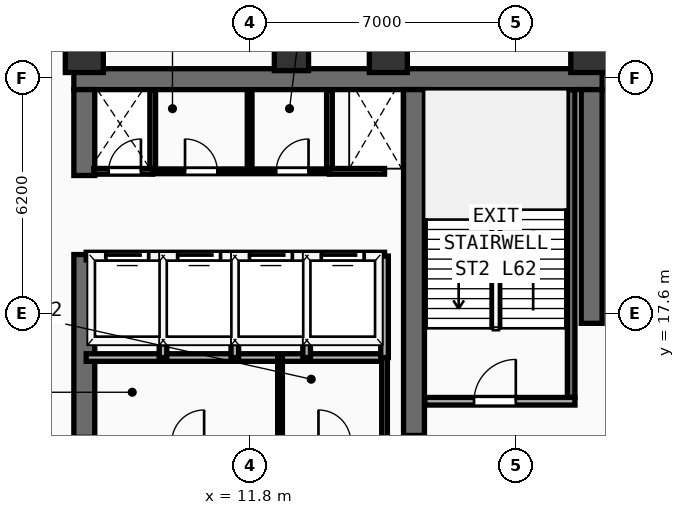
"""IFC4 building model, lengths in metres.
Left out: names, types, materials, properties, quantities, classifications, styles, units other than length and angle.
Written with IfcOpenShell. Run it as: python <this file> out.ifc"""

import sys

from ifc_helpers import new_model, si_unit, direction, frame, frame_2d, origin, origin_2d, place, context, subcontext, project, spatial, rectangle, extrude, element, fill, save


model = new_model("IFC4")
c1 = context("Model", 3, precision=1e-05, world=origin(), true_north=direction((0.0, 1.0)))
c2 = subcontext(c1, "Body", "Model", "MODEL_VIEW")
j1 = project(units=[si_unit("LENGTHUNIT", "METRE"), si_unit("PLANEANGLEUNIT", "RADIAN")], contexts=[c1])
p1 = place(None, origin())
s1 = spatial("IfcSite", under=j1, at=p1, CompositionType="ELEMENT")
p2 = place(p1, origin())
s2 = spatial("IfcBuilding", under=s1, at=p2, CompositionType="ELEMENT")
p3 = place(p2, frame((0.0, 0.0, 242.5)))
s3 = spatial("IfcBuildingStorey", under=s2, at=p3, CompositionType="ELEMENT", Elevation=242.5)
p4 = place(p3, frame((7.175, 23.775, 0.0), z_axis=(0.0, 0.0, 1.0), x_axis=(1.0, 0.0, 0.0)))
e1 = element("IfcWall", 1, at=p4, inside=s3, PredefinedType="SHEAR", context=c2, shape_type="SweptSolid", body=[
    extrude(rectangle(XDim=13.9, YDim=0.55, at=frame_2d((6.95, 0.0))), origin(), (0.0, 0.0, 1.0), 3.56),
])
p5 = place(p3, frame((7.45, 14.35, 0.0), z_axis=(0.0, 0.0, 1.0), x_axis=(0.0, 1.0, 0.0)))
e2 = element("IfcWall", 2, at=p5, inside=s3, PredefinedType="SHEAR", context=c2, shape_type="SweptSolid", body=[
    extrude(rectangle(XDim=4.81, YDim=0.55, at=frame_2d((2.405, 0.0))), origin(), (0.0, 0.0, 1.0), 3.56),
])
p6 = place(p3, frame((7.45, 21.24, 0.0), z_axis=(0.0, 0.0, 1.0), x_axis=(0.0, 1.0, 0.0)))
e3 = element("IfcWall", 3, at=p6, inside=s3, PredefinedType="SHEAR", context=c2, shape_type="SweptSolid", body=[
    extrude(rectangle(XDim=2.26, YDim=0.55, at=frame_2d((1.13, 0.0))), origin(), (0.0, 0.0, 1.0), 3.56),
])
p7 = place(p3, frame((20.8, 17.35, 0.0), z_axis=(0.0, 0.0, 1.0), x_axis=(0.0, 1.0, 0.0)))
e4 = element("IfcWall", 4, at=p7, inside=s3, PredefinedType="SHEAR", context=c2, shape_type="SweptSolid", body=[
    extrude(rectangle(XDim=6.15, YDim=0.55, at=frame_2d((3.075, 0.0))), origin(), (0.0, 0.0, 1.0), 3.56),
])
p8 = place(p3, frame((16.125, 14.4, 0.0), z_axis=(0.0, 0.0, 1.0), x_axis=(0.0, 1.0, 0.0)))
e5 = element("IfcWall", 5, at=p8, inside=s3, PredefinedType="SHEAR", context=c2, shape_type="SweptSolid", body=[
    extrude(rectangle(XDim=9.1, YDim=0.55, at=frame_2d((4.55, 0.0))), origin(), (0.0, 0.0, 1.0), 3.56),
])
for number, where, z_axis, x_axis in (
    (6, (7.45, 24.45, 0.0), (0.0, 0.0, 1.0), (1.0, 0.0, 0.0)),
    (7, (15.45, 24.45, 0.0), (0.0, 0.0, 1.0), (1.0, 0.0, 0.0)),
    (8, (20.75, 24.45, 0.0), (0.0, 0.0, 1.0), (1.0, 0.0, 0.0)),
):
    element("IfcColumn", number, at=place(p3, frame(where, z_axis=z_axis, x_axis=x_axis)), inside=s3, PredefinedType="COLUMN", context=c2, shape_type="SweptSolid", body=[
        extrude(rectangle(XDim=1.0, YDim=1.0, at=origin_2d()), origin(), (0.0, 0.0, 1.0), 3.56),
    ])
p9 = place(p3, frame((12.9, 24.45, 0.0), z_axis=(0.0, 0.0, 1.0), x_axis=(1.0, 0.0, 0.0)))
e9 = element("IfcColumn", 9, at=p9, inside=s3, PredefinedType="COLUMN", context=c2, shape_type="SweptSolid", body=[
    extrude(rectangle(XDim=0.9, YDim=0.9, at=origin_2d()), origin(), (0.0, 0.0, 1.0), 3.56),
])
p10 = place(p3, frame((27.685, 19.775, 0.0), z_axis=(0.0, 0.0, 1.0), x_axis=(-0.707106781187, 0.707106781187, 0.0)))
e10 = element("IfcWall", 10, at=p10, inside=s3, PredefinedType="SOLIDWALL", context=c2, shape_type="SweptSolid", body=[
    extrude(rectangle(XDim=9.207, YDim=0.28, at=frame_2d((4.603, 0.0))), origin(), (0.0, 0.0, 1.0), 3.56),
])
p11 = place(p3, frame((20.26, 15.4, 0.0), z_axis=(0.0, 0.0, 1.0), x_axis=(0.0, 1.0, 0.0)))
e11 = element("IfcWall", 11, at=p11, inside=s3, PredefinedType="SHEAR", context=c2, shape_type="SweptSolid", body=[
    extrude(rectangle(XDim=8.09, YDim=0.2, at=frame_2d((4.045, 0.0))), origin(), (0.0, 0.0, 1.0), 3.56),
])
p12 = place(p3, frame((16.41, 15.3, 0.0), z_axis=(0.0, 0.0, 1.0), x_axis=(1.0, 0.0, 0.0)))
e12 = element("IfcWall", 12, at=p12, inside=s3, PredefinedType="PARTITIONING", context=c2, shape_type="SweptSolid", body=[
    extrude(rectangle(XDim=3.95, YDim=0.2, at=frame_2d((1.975, 0.0))), origin(), (0.0, 0.0, 1.0), 3.56),
])
p13 = place(p12, frame((1.294, 0.0, 0.0)))
e13 = element("IfcOpeningElement", 13, at=p13, cuts=e12, PredefinedType="OPENING", context=c2, shape_type="SweptSolid", body=[
    extrude(rectangle(XDim=1.1, YDim=2.2, at=frame_2d((0.55, 1.1))), frame((0.0, 0.11, 0.0), z_axis=(0.0, -1.0, 0.0), x_axis=(1.0, 0.0, 0.0)), (0.0, 0.0, 1.0), 0.22),
])
p14 = place(p3, frame((7.5, 16.45, 0.0), z_axis=(0.0, 0.0, 1.0), x_axis=(1.0, 0.0, 0.0)))
e14 = element("IfcWall", 14, at=p14, inside=s3, PredefinedType="PARTITIONING", context=c2, shape_type="SweptSolid", body=[
    extrude(rectangle(XDim=7.85, YDim=0.2, at=frame_2d((3.925, 0.0))), origin(), (0.0, 0.0, 1.0), 3.56),
])
p15 = place(p3, frame((15.35, 14.22, 0.0), z_axis=(0.0, 0.0, 1.0), x_axis=(0.0, 1.0, 0.0)))
e15 = element("IfcWall", 15, at=p15, inside=s3, PredefinedType="PARTITIONING", context=c2, shape_type="SweptSolid", body=[
    extrude(rectangle(XDim=2.23, YDim=0.15, at=frame_2d((1.115, 0.0))), origin(), (0.0, 0.0, 1.0), 3.56),
])
p16 = place(p3, frame((12.6, 14.22, 0.0), z_axis=(0.0, 0.0, 1.0), x_axis=(0.0, 1.0, 0.0)))
e16 = element("IfcWall", 16, at=p16, inside=s3, PredefinedType="PARTITIONING", context=c2, shape_type="SweptSolid", body=[
    extrude(rectangle(XDim=2.23, YDim=0.125, at=frame_2d((1.115, 0.0))), origin(), (0.0, 0.0, 1.0), 3.56),
])
p17 = place(p3, frame((7.5, 19.12, 0.0), z_axis=(0.0, 0.0, 1.0), x_axis=(1.0, 0.0, 0.0)))
e17 = element("IfcWall", 17, at=p17, inside=s3, PredefinedType="PARTITIONING", context=c2, shape_type="SweptSolid", body=[
    extrude(rectangle(XDim=7.85, YDim=0.2, at=frame_2d((3.925, 0.0))), origin(), (0.0, 0.0, 1.0), 3.56),
])
p18 = place(p17, frame((0.53, 0.0, 0.0)))
e18 = element("IfcOpeningElement", 18, at=p18, cuts=e17, PredefinedType="OPENING", context=c2, shape_type="SweptSolid", body=[
    extrude(rectangle(XDim=1.1, YDim=2.2, at=frame_2d((0.55, 1.1))), frame((0.0, 0.11, 0.0), z_axis=(0.0, -1.0, 0.0), x_axis=(1.0, 0.0, 0.0)), (0.0, 0.0, 1.0), 0.22),
])
p19 = place(p17, frame((2.42, 0.0, 0.0)))
e19 = element("IfcOpeningElement", 19, at=p19, cuts=e17, PredefinedType="OPENING", context=c2, shape_type="SweptSolid", body=[
    extrude(rectangle(XDim=1.1, YDim=2.2, at=frame_2d((0.55, 1.1))), frame((0.0, 0.11, 0.0), z_axis=(0.0, -1.0, 0.0), x_axis=(1.0, 0.0, 0.0)), (0.0, 0.0, 1.0), 0.22),
])
p20 = place(p17, frame((4.31, 0.0, 0.0)))
e20 = element("IfcOpeningElement", 20, at=p20, cuts=e17, PredefinedType="OPENING", context=c2, shape_type="SweptSolid", body=[
    extrude(rectangle(XDim=1.1, YDim=2.2, at=frame_2d((0.55, 1.1))), frame((0.0, 0.11, 0.0), z_axis=(0.0, -1.0, 0.0), x_axis=(1.0, 0.0, 0.0)), (0.0, 0.0, 1.0), 0.22),
])
p21 = place(p17, frame((6.2, 0.0, 0.0)))
e21 = element("IfcOpeningElement", 21, at=p21, cuts=e17, PredefinedType="OPENING", context=c2, shape_type="SweptSolid", body=[
    extrude(rectangle(XDim=1.1, YDim=2.2, at=frame_2d((0.55, 1.1))), frame((0.0, 0.11, 0.0), z_axis=(0.0, -1.0, 0.0), x_axis=(1.0, 0.0, 0.0)), (0.0, 0.0, 1.0), 0.22),
])
for number, where, z_axis, x_axis in (
    (22, (15.35, 16.45, 0.0), (0.0, 0.0, 1.0), (0.0, 1.0, 0.0)),
    (23, (9.52, 16.45, 0.0), (0.0, 0.0, 1.0), (0.0, 1.0, 0.0)),
    (24, (11.41, 16.45, 0.0), (0.0, 0.0, 1.0), (0.0, 1.0, 0.0)),
    (25, (13.3, 16.45, 0.0), (0.0, 0.0, 1.0), (0.0, 1.0, 0.0)),
):
    element("IfcWall", number, at=place(p3, frame(where, z_axis=z_axis, x_axis=x_axis)), inside=s3, PredefinedType="PARTITIONING", context=c2, shape_type="SweptSolid", body=[
        extrude(rectangle(XDim=2.67, YDim=0.2, at=frame_2d((1.335, 0.0))), origin(), (0.0, 0.0, 1.0), 3.56),
    ])
for number, where, z_axis, x_axis in (
    (26, (9.25, 21.35, 0.0), (0.0, 0.0, 1.0), (0.0, 1.0, 0.0)),
    (27, (13.9, 21.35, 0.0), (0.0, 0.0, 1.0), (0.0, 1.0, 0.0)),
):
    element("IfcWall", number, at=place(p3, frame(where, z_axis=z_axis, x_axis=x_axis)), inside=s3, PredefinedType="PARTITIONING", context=c2, shape_type="SweptSolid", body=[
        extrude(rectangle(XDim=2.13, YDim=0.15, at=frame_2d((1.065, 0.0))), origin(), (0.0, 0.0, 1.0), 3.56),
    ])
p22 = place(p3, frame((7.7, 21.35, 0.0), z_axis=(0.0, 0.0, 1.0), x_axis=(1.0, 0.0, 0.0)))
e28 = element("IfcWall", 28, at=p22, inside=s3, PredefinedType="PARTITIONING", context=c2, shape_type="SweptSolid", body=[
    extrude(rectangle(XDim=1.55, YDim=0.15, at=frame_2d((0.775, 0.0))), origin(), (0.0, 0.0, 1.0), 3.56),
])
p23 = place(p22, frame((0.39, 0.0, 0.0)))
e29 = element("IfcOpeningElement", 29, at=p23, cuts=e28, PredefinedType="OPENING", context=c2, shape_type="SweptSolid", body=[
    extrude(rectangle(XDim=0.85, YDim=2.15, at=frame_2d((0.425, 1.075))), frame((0.0, 0.085, 0.0), z_axis=(0.0, -1.0, 0.0), x_axis=(1.0, 0.0, 0.0)), (0.0, 0.0, 1.0), 0.17),
])
p24 = place(p3, frame((13.9, 21.35, 0.0), z_axis=(0.0, 0.0, 1.0), x_axis=(1.0, 0.0, 0.0)))
e30 = element("IfcWall", 30, at=p24, inside=s3, PredefinedType="PARTITIONING", context=c2, shape_type="SweptSolid", body=[
    extrude(rectangle(XDim=1.45, YDim=0.15, at=frame_2d((0.725, 0.0))), origin(), (0.0, 0.0, 1.0), 3.56),
])
p25 = place(p3, frame((9.25, 21.35, 0.0), z_axis=(0.0, 0.0, 1.0), x_axis=(1.0, 0.0, 0.0)))
e31 = element("IfcWall", 31, at=p25, inside=s3, PredefinedType="PARTITIONING", context=c2, shape_type="SweptSolid", body=[
    extrude(rectangle(XDim=4.65, YDim=0.125, at=frame_2d((2.325, 0.0))), origin(), (0.0, 0.0, 1.0), 3.56),
])
p26 = place(p25, frame((0.85, 0.0, 0.0)))
e32 = element("IfcOpeningElement", 32, at=p26, cuts=e31, PredefinedType="OPENING", context=c2, shape_type="SweptSolid", body=[
    extrude(rectangle(XDim=0.85, YDim=2.15, at=frame_2d((0.425, 1.075))), frame((0.0, 0.073, 0.0), z_axis=(0.0, -1.0, 0.0), x_axis=(1.0, 0.0, 0.0)), (0.0, 0.0, 1.0), 0.145),
])
p27 = place(p25, frame((3.25, 0.0, 0.0)))
e33 = element("IfcOpeningElement", 33, at=p27, cuts=e31, PredefinedType="OPENING", context=c2, shape_type="SweptSolid", body=[
    extrude(rectangle(XDim=0.85, YDim=2.15, at=frame_2d((0.425, 1.075))), frame((0.0, 0.073, 0.0), z_axis=(0.0, -1.0, 0.0), x_axis=(1.0, 0.0, 0.0)), (0.0, 0.0, 1.0), 0.145),
])
p28 = place(p3, frame((11.8, 21.35, 0.0), z_axis=(0.0, 0.0, 1.0), x_axis=(0.0, 1.0, 0.0)))
e34 = element("IfcWall", 34, at=p28, inside=s3, PredefinedType="PARTITIONING", context=c2, shape_type="SweptSolid", body=[
    extrude(rectangle(XDim=2.13, YDim=0.125, at=frame_2d((1.065, 0.0))), origin(), (0.0, 0.0, 1.0), 3.56),
])
p29 = place(p13, origin())
e35 = element("IfcDoor", 35, at=p29, inside=s3, OperationType="SINGLE_SWING_RIGHT", PredefinedType="DOOR", context=c2, shape_type="SweptSolid", body=[
    extrude(rectangle(XDim=1.1, YDim=2.2, at=frame_2d((0.55, 1.1))), frame((0.0, 0.025, 0.0), z_axis=(0.0, -1.0, 0.0), x_axis=(1.0, 0.0, 0.0)), (0.0, 0.0, 1.0), 0.05),
])
fill(e13, e35)
p30 = place(p18, origin())
e36 = element("IfcDoor", 36, at=p30, inside=s3, OperationType="SLIDING_TO_LEFT", PredefinedType="DOOR", context=c2, shape_type="SweptSolid", body=[
    extrude(rectangle(XDim=1.1, YDim=2.2, at=frame_2d((0.55, 1.1))), frame((0.0, 0.025, 0.0), z_axis=(0.0, -1.0, 0.0), x_axis=(1.0, 0.0, 0.0)), (0.0, 0.0, 1.0), 0.05),
])
fill(e18, e36)
p31 = place(p19, origin())
e37 = element("IfcDoor", 37, at=p31, inside=s3, OperationType="SLIDING_TO_LEFT", PredefinedType="DOOR", context=c2, shape_type="SweptSolid", body=[
    extrude(rectangle(XDim=1.1, YDim=2.2, at=frame_2d((0.55, 1.1))), frame((0.0, 0.025, 0.0), z_axis=(0.0, -1.0, 0.0), x_axis=(1.0, 0.0, 0.0)), (0.0, 0.0, 1.0), 0.05),
])
fill(e19, e37)
p32 = place(p20, origin())
e38 = element("IfcDoor", 38, at=p32, inside=s3, OperationType="SLIDING_TO_LEFT", PredefinedType="DOOR", context=c2, shape_type="SweptSolid", body=[
    extrude(rectangle(XDim=1.1, YDim=2.2, at=frame_2d((0.55, 1.1))), frame((0.0, 0.025, 0.0), z_axis=(0.0, -1.0, 0.0), x_axis=(1.0, 0.0, 0.0)), (0.0, 0.0, 1.0), 0.05),
])
fill(e20, e38)
p33 = place(p21, origin())
e39 = element("IfcDoor", 39, at=p33, inside=s3, OperationType="SLIDING_TO_LEFT", PredefinedType="DOOR", context=c2, shape_type="SweptSolid", body=[
    extrude(rectangle(XDim=1.1, YDim=2.2, at=frame_2d((0.55, 1.1))), frame((0.0, 0.025, 0.0), z_axis=(0.0, -1.0, 0.0), x_axis=(1.0, 0.0, 0.0)), (0.0, 0.0, 1.0), 0.05),
])
fill(e21, e39)
p34 = place(p23, origin())
e40 = element("IfcDoor", 40, at=p34, inside=s3, OperationType="SINGLE_SWING_RIGHT", PredefinedType="DOOR", context=c2, shape_type="SweptSolid", body=[
    extrude(rectangle(XDim=0.85, YDim=2.15, at=frame_2d((0.425, 1.075))), frame((0.0, 0.025, 0.0), z_axis=(0.0, -1.0, 0.0), x_axis=(1.0, 0.0, 0.0)), (0.0, 0.0, 1.0), 0.05),
])
fill(e29, e40)
p35 = place(p26, origin())
e41 = element("IfcDoor", 41, at=p35, inside=s3, OperationType="SINGLE_SWING_LEFT", PredefinedType="DOOR", context=c2, shape_type="SweptSolid", body=[
    extrude(rectangle(XDim=0.85, YDim=2.15, at=frame_2d((0.425, 1.075))), frame((0.0, 0.025, 0.0), z_axis=(0.0, -1.0, 0.0), x_axis=(1.0, 0.0, 0.0)), (0.0, 0.0, 1.0), 0.05),
])
fill(e32, e41)
p36 = place(p27, origin())
e42 = element("IfcDoor", 42, at=p36, inside=s3, OperationType="SINGLE_SWING_RIGHT", PredefinedType="DOOR", context=c2, shape_type="SweptSolid", body=[
    extrude(rectangle(XDim=0.85, YDim=2.15, at=frame_2d((0.425, 1.075))), frame((0.0, 0.025, 0.0), z_axis=(0.0, -1.0, 0.0), x_axis=(1.0, 0.0, 0.0)), (0.0, 0.0, 1.0), 0.05),
])
fill(e33, e42)
save(model, sys.argv[1])
